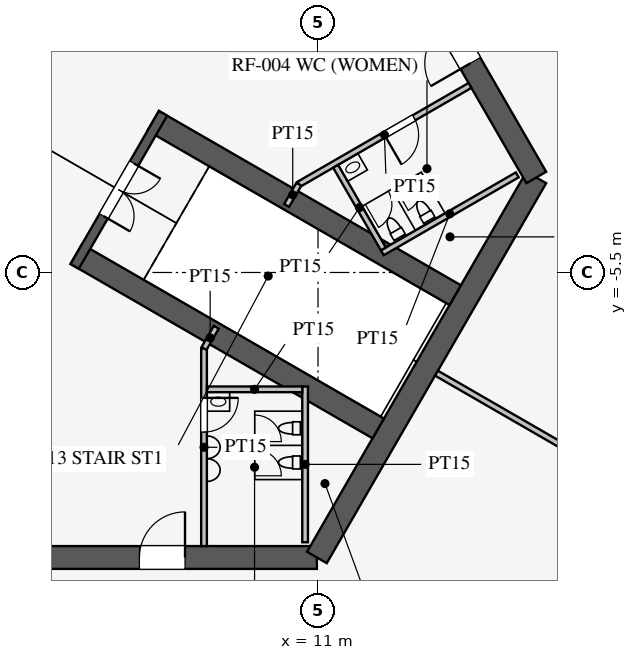
"""IFC4 building model, lengths in metres.
Left out: names, types, materials, properties, quantities, classifications, styles, units other than length and angle.
Written with IfcOpenShell. Run it as: python <this file> out.ifc"""

import sys

from ifc_helpers import new_model, si_unit, direction, frame, frame_2d, origin, place, context, subcontext, project, spatial, polyline, rectangle, outline, extrude, element, fill, save


model = new_model("IFC4")
c1 = context("Model", 3, precision=1e-05, world=origin(), true_north=direction((0.0, 1.0)))
c2 = subcontext(c1, "Body", "Model", "MODEL_VIEW")
j1 = project(units=[si_unit("LENGTHUNIT", "METRE"), si_unit("PLANEANGLEUNIT", "RADIAN")], contexts=[c1])
p1 = place(None, origin())
s1 = spatial("IfcSite", under=j1, at=p1, CompositionType="ELEMENT")
p2 = place(p1, origin())
s2 = spatial("IfcBuilding", under=s1, at=p2, CompositionType="ELEMENT")
p3 = place(p2, frame((0.0, 0.0, 328.5)))
s3 = spatial("IfcBuildingStorey", under=s2, at=p3, CompositionType="ELEMENT", Elevation=328.5)
p4 = place(p3, frame((-10.97, -13.0, 0.0), z_axis=(0.0, 0.0, 1.0), x_axis=(1.0, 0.0, 0.0)))
e1 = element("IfcWall", 1, at=p4, inside=s3, PredefinedType="SHEAR", context=c2, shape_type="SweptSolid", body=[
    extrude(outline(polyline([(0.0, 0.0), (21.939, 0.0), (21.939, 8.31), (0.0, 8.31), (0.0, 0.0)])), frame((0.0, 0.3, 0.0), z_axis=(0.0, -1.0, 0.0), x_axis=(1.0, 0.0, 0.0)), (0.0, 0.0, 1.0), 0.6),
])
p5 = place(p4, frame((17.27, 0.0, 0.0)))
e2 = element("IfcOpeningElement", 2, at=p5, cuts=e1, PredefinedType="OPENING", context=c2, shape_type="SweptSolid", body=[
    extrude(rectangle(XDim=1.2, YDim=2.1, at=frame_2d((0.6, 1.05))), frame((0.0, 0.31, 0.0), z_axis=(0.0, -1.0, 0.0), x_axis=(1.0, 0.0, 0.0)), (0.0, 0.0, 1.0), 0.62),
])
p6 = place(p4, frame((3.47, 0.0, 0.0)))
e3 = element("IfcOpeningElement", 3, at=p6, cuts=e1, PredefinedType="OPENING", context=c2, shape_type="SweptSolid", body=[
    extrude(rectangle(XDim=1.2, YDim=2.1, at=frame_2d((0.6, 1.05))), frame((0.0, 0.31, 0.0), z_axis=(0.0, -1.0, 0.0), x_axis=(1.0, 0.0, 0.0)), (0.0, 0.0, 1.0), 0.62),
])
p7 = place(p3, frame((10.97, -13.0, 0.0), z_axis=(0.0, 0.0, 1.0), x_axis=(0.499995765644, 0.866027848477, 0.0)))
e4 = element("IfcWall", 4, at=p7, inside=s3, PredefinedType="SHEAR", context=c2, shape_type="SweptSolid", body=[
    extrude(outline(polyline([(0.0, 0.0), (11.547, 0.0), (11.547, 12.973), (0.0, 8.31), (0.0, 0.0)])), frame((0.0, 0.3, 0.0), z_axis=(0.0, -1.0, 0.0), x_axis=(1.0, 0.0, 0.0)), (0.0, 0.0, 1.0), 0.6),
])
p8 = place(p3, frame((16.743, -3.0, 0.0), z_axis=(0.0, 0.0, 1.0), x_axis=(-0.500002442456, 0.866023993627, 0.0)))
e5 = element("IfcWall", 5, at=p8, inside=s3, PredefinedType="SHEAR", context=c2, shape_type="SweptSolid", body=[
    extrude(outline(polyline([(0.0, 0.0), (21.939, 0.0), (21.939, 21.833), (0.0, 12.973), (0.0, 0.0)])), frame((0.0, 0.3, 0.0), z_axis=(0.0, -1.0, 0.0), x_axis=(1.0, 0.0, 0.0)), (0.0, 0.0, 1.0), 0.6),
])
p9 = place(p8, frame((17.27, 0.0, 0.0)))
e6 = element("IfcOpeningElement", 6, at=p9, cuts=e5, PredefinedType="OPENING", context=c2, shape_type="SweptSolid", body=[
    extrude(rectangle(XDim=1.2, YDim=2.1, at=frame_2d((0.6, 1.05))), frame((0.0, 0.31, 0.0), z_axis=(0.0, -1.0, 0.0), x_axis=(1.0, 0.0, 0.0)), (0.0, 0.0, 1.0), 0.62),
])
p10 = place(p8, frame((3.47, 0.0, 0.0)))
e7 = element("IfcOpeningElement", 7, at=p10, cuts=e5, PredefinedType="OPENING", context=c2, shape_type="SweptSolid", body=[
    extrude(rectangle(XDim=1.2, YDim=2.1, at=frame_2d((0.6, 1.05))), frame((0.0, 0.31, 0.0), z_axis=(0.0, -1.0, 0.0), x_axis=(1.0, 0.0, 0.0)), (0.0, 0.0, 1.0), 0.62),
])
p11 = place(p3, frame((4.638, -5.016, 0.0), z_axis=(0.0, 0.0, 1.0), x_axis=(0.866012320003, -0.50002266109, 0.0)))
e8 = element("IfcWall", 8, at=p11, inside=s3, PredefinedType="SHEAR", context=c2, shape_type="SweptSolid", body=[
    extrude(rectangle(XDim=9.175, YDim=0.6, at=frame_2d((4.587, 0.0))), origin(), (0.0, 0.0, 1.0), 3.2),
])
p12 = place(p3, frame((6.663, -1.509, 0.0), z_axis=(0.0, 0.0, 1.0), x_axis=(0.86603049496, -0.499991181721, 0.0)))
e9 = element("IfcWall", 9, at=p12, inside=s3, PredefinedType="SHEAR", context=c2, shape_type="SweptSolid", body=[
    extrude(rectangle(XDim=9.175, YDim=0.6, at=frame_2d((4.587, 0.0))), origin(), (0.0, 0.0, 1.0), 3.2),
])
p13 = place(p3, frame((4.597, -5.339, 0.0), z_axis=(0.0, 0.0, 1.0), x_axis=(0.499984536904, 0.866034331223, 0.0)))
e10 = element("IfcWall", 10, at=p13, inside=s3, PredefinedType="SHEAR", context=c2, shape_type="SweptSolid", body=[
    extrude(rectangle(XDim=4.65, YDim=0.25, at=frame_2d((2.325, 0.0))), origin(), (0.0, 0.0, 1.0), 3.2),
])
p14 = place(p13, frame((1.525, 0.0, 0.0)))
e11 = element("IfcOpeningElement", 11, at=p14, cuts=e10, PredefinedType="OPENING", context=c2, shape_type="SweptSolid", body=[
    extrude(rectangle(XDim=1.6, YDim=2.1, at=frame_2d((0.8, 1.05))), frame((0.0, 0.135, 0.0), z_axis=(0.0, -1.0, 0.0), x_axis=(1.0, 0.0, 0.0)), (0.0, 0.0, 1.0), 0.27),
])
p15 = place(p3, frame((8.0, -7.5, 0.0), z_axis=(0.0, 0.0, 1.0), x_axis=(0.0, -1.0, 0.0)))
e12 = element("IfcWall", 12, at=p15, inside=s3, PredefinedType="PARTITIONING", context=c2, shape_type="SweptSolid", body=[
    extrude(rectangle(XDim=5.2, YDim=0.15, at=frame_2d((2.6, 0.0))), origin(), (0.0, 0.0, 1.0), 3.2),
])
p16 = place(p15, frame((1.3, 0.0, 0.0)))
e13 = element("IfcOpeningElement", 13, at=p16, cuts=e12, PredefinedType="OPENING", context=c2, shape_type="SweptSolid", body=[
    extrude(rectangle(XDim=0.9, YDim=2.1, at=frame_2d((0.45, 1.05))), frame((0.0, 0.085, 0.0), z_axis=(0.0, -1.0, 0.0), x_axis=(1.0, 0.0, 0.0)), (0.0, 0.0, 1.0), 0.17),
])
p17 = place(p3, frame((10.495, -3.178, 0.0), z_axis=(0.0, 0.0, 1.0), x_axis=(0.866021400173, 0.500006934395, 0.0)))
e14 = element("IfcWall", 14, at=p17, inside=s3, PredefinedType="PARTITIONING", context=c2, shape_type="SweptSolid", body=[
    extrude(rectangle(XDim=5.2, YDim=0.15, at=frame_2d((2.6, 0.0))), origin(), (0.0, 0.0, 1.0), 3.2),
])
p18 = place(p17, frame((2.6, 0.0, 0.0)))
e15 = element("IfcOpeningElement", 15, at=p18, cuts=e14, PredefinedType="OPENING", context=c2, shape_type="SweptSolid", body=[
    extrude(rectangle(XDim=0.9, YDim=2.1, at=frame_2d((0.45, 1.05))), frame((0.0, 0.085, 0.0), z_axis=(0.0, -1.0, 0.0), x_axis=(1.0, 0.0, 0.0)), (0.0, 0.0, 1.0), 0.17),
])
for number, where, z_axis, x_axis in (
    (16, (8.0, -7.5, 0.0), (0.0, 0.0, 1.0), (0.5, 0.866, 0.0)),
    (17, (10.495, -3.178, 0.0), (0.0, 0.0, 1.0), (-0.5, -0.866, 0.0)),
):
    element("IfcWall", number, at=place(p3, frame(where, z_axis=z_axis, x_axis=x_axis)), inside=s3, PredefinedType="PARTITIONING", context=c2, shape_type="SweptSolid", body=[
        extrude(rectangle(XDim=0.645, YDim=0.15, at=frame_2d((0.323, 0.0))), origin(), (0.0, 0.0, 1.0), 3.2),
    ])
p19 = place(p3, frame((10.66, -8.5, 0.0), z_axis=(0.0, 0.0, 1.0), x_axis=(0.0, -1.0, 0.0)))
e18 = element("IfcWall", 18, at=p19, inside=s3, PredefinedType="PARTITIONING", context=c2, shape_type="SweptSolid", body=[
    extrude(rectangle(XDim=4.1, YDim=0.15, at=frame_2d((2.05, 0.0))), origin(), (0.0, 0.0, 1.0), 3.2),
])
p20 = place(p3, frame((8.075, -8.575, 0.0), z_axis=(0.0, 0.0, 1.0), x_axis=(1.0, 0.0, 0.0)))
e19 = element("IfcWall", 19, at=p20, inside=s3, PredefinedType="PARTITIONING", context=c2, shape_type="SweptSolid", body=[
    extrude(rectangle(XDim=2.51, YDim=0.15, at=frame_2d((1.255, 0.0))), origin(), (0.0, 0.0, 1.0), 3.2),
])
p21 = place(p3, frame((12.691, -4.982, 0.0), z_axis=(0.0, 0.0, 1.0), x_axis=(0.8660249478, 0.500000789788, 0.0)))
e20 = element("IfcWall", 20, at=p21, inside=s3, PredefinedType="PARTITIONING", context=c2, shape_type="SweptSolid", body=[
    extrude(rectangle(XDim=4.1, YDim=0.15, at=frame_2d((2.05, 0.0))), origin(), (0.0, 0.0, 1.0), 3.2),
])
p22 = place(p3, frame((11.464, -2.706, 0.0), z_axis=(0.0, 0.0, 1.0), x_axis=(0.50001992892, -0.866013897511, 0.0)))
e21 = element("IfcWall", 21, at=p22, inside=s3, PredefinedType="PARTITIONING", context=c2, shape_type="SweptSolid", body=[
    extrude(rectangle(XDim=2.51, YDim=0.15, at=frame_2d((1.255, 0.0))), origin(), (0.0, 0.0, 1.0), 3.2),
])
p23 = place(p3, frame((14.116, -8.15, 0.0), z_axis=(0.0, 0.0, 1.0), x_axis=(0.866020541135, -0.500008422262, 0.0)))
e22 = element("IfcWall", 22, at=p23, inside=s3, PredefinedType="PARTITIONING", context=c2, shape_type="SweptSolid", body=[
    extrude(rectangle(XDim=13.45, YDim=0.15, at=frame_2d((6.725, 0.0))), origin(), (0.0, 0.0, 1.0), 3.2),
])
p24 = place(p16, origin())
e23 = element("IfcDoor", 23, at=p24, inside=s3, OperationType="SINGLE_SWING_LEFT", PredefinedType="DOOR", context=c2, shape_type="SweptSolid", body=[
    extrude(rectangle(XDim=0.9, YDim=2.1, at=frame_2d((0.45, 1.05))), frame((0.0, 0.025, 0.0), z_axis=(0.0, -1.0, 0.0), x_axis=(1.0, 0.0, 0.0)), (0.0, 0.0, 1.0), 0.05),
])
fill(e13, e23)
p25 = place(p18, frame((0.9, 0.0, 0.0), z_axis=(0.0, 0.0, 1.0), x_axis=(-1.0, 0.0, 0.0)))
e24 = element("IfcDoor", 24, at=p25, inside=s3, OperationType="SINGLE_SWING_RIGHT", PredefinedType="DOOR", context=c2, shape_type="SweptSolid", body=[
    extrude(rectangle(XDim=0.9, YDim=2.1, at=frame_2d((0.45, 1.05))), frame((0.0, 0.025, 0.0), z_axis=(0.0, -1.0, 0.0), x_axis=(1.0, 0.0, 0.0)), (0.0, 0.0, 1.0), 0.05),
])
fill(e15, e24)
p26 = place(p14, frame((1.6, 0.0, 0.0), z_axis=(0.0, 0.0, 1.0), x_axis=(-1.0, 0.0, 0.0)))
e25 = element("IfcDoor", 25, at=p26, inside=s3, OperationType="DOUBLE_DOOR_SINGLE_SWING", PredefinedType="DOOR", context=c2, shape_type="SweptSolid", body=[
    extrude(rectangle(XDim=1.6, YDim=2.1, at=frame_2d((0.8, 1.05))), frame((0.0, 0.025, 0.0), z_axis=(0.0, -1.0, 0.0), x_axis=(1.0, 0.0, 0.0)), (0.0, 0.0, 1.0), 0.05),
])
fill(e11, e25)
p27 = place(p5, origin())
e26 = element("IfcDoor", 26, at=p27, inside=s3, OperationType="SINGLE_SWING_RIGHT", PredefinedType="DOOR", context=c2, shape_type="SweptSolid", body=[
    extrude(rectangle(XDim=1.2, YDim=2.1, at=frame_2d((0.6, 1.05))), frame((0.0, 0.025, 0.0), z_axis=(0.0, -1.0, 0.0), x_axis=(1.0, 0.0, 0.0)), (0.0, 0.0, 1.0), 0.05),
])
fill(e2, e26)
p28 = place(p10, origin())
e27 = element("IfcDoor", 27, at=p28, inside=s3, OperationType="SINGLE_SWING_LEFT", PredefinedType="DOOR", context=c2, shape_type="SweptSolid", body=[
    extrude(rectangle(XDim=1.2, YDim=2.1, at=frame_2d((0.6, 1.05))), frame((0.0, 0.025, 0.0), z_axis=(0.0, -1.0, 0.0), x_axis=(1.0, 0.0, 0.0)), (0.0, 0.0, 1.0), 0.05),
])
fill(e7, e27)
save(model, sys.argv[1])
